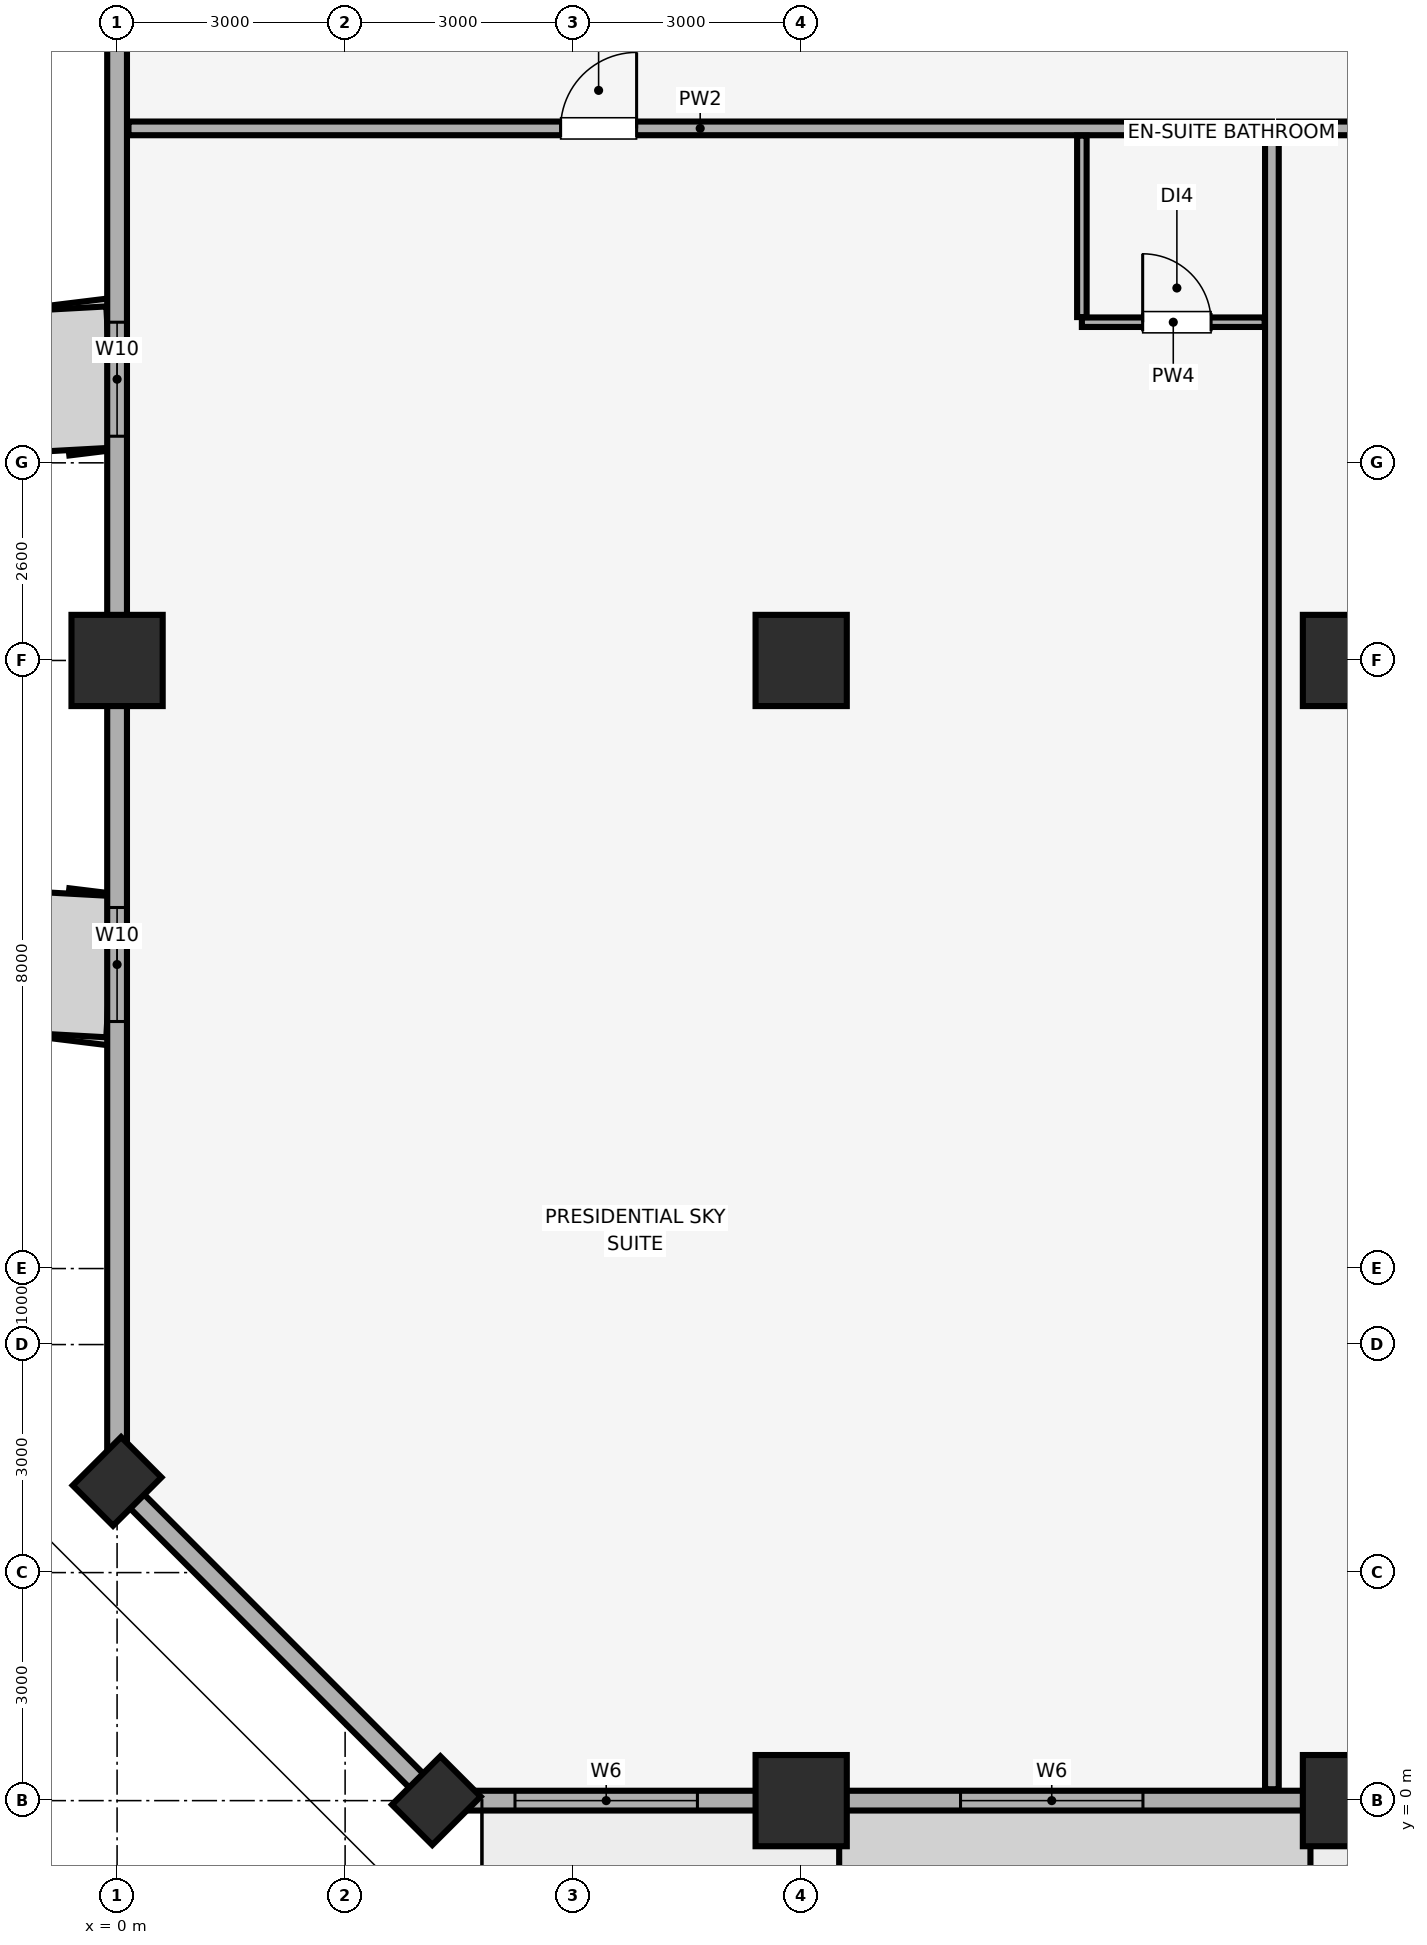
"""IFC4 building model, lengths in metres.
Left out: names, types, materials, properties, quantities, classifications, styles, units other than length and angle.
Written with IfcOpenShell. Run it as: python <this file> out.ifc"""

import sys

from ifc_helpers import new_model, si_unit, direction, frame, frame_2d, origin, origin_2d, place, context, subcontext, project, spatial, rectangle, extrude, element, fill, save


model = new_model("IFC4")
c1 = context("Model", 3, precision=1e-05, world=origin(), true_north=direction((0.0, 1.0)))
c2 = subcontext(c1, "Body", "Model", "MODEL_VIEW")
j1 = project(units=[si_unit("LENGTHUNIT", "METRE"), si_unit("PLANEANGLEUNIT", "RADIAN")], contexts=[c1])
p1 = place(None, origin())
s1 = spatial("IfcSite", under=j1, at=p1, CompositionType="ELEMENT")
p2 = place(p1, origin())
s2 = spatial("IfcBuilding", under=s1, at=p2, CompositionType="ELEMENT")
p3 = place(p2, frame((0.0, 0.0, 104.3)))
s3 = spatial("IfcBuildingStorey", under=s2, at=p3, CompositionType="ELEMENT", Elevation=104.3)
for number, where, z_axis, x_axis in (
    (1, (9.0, 0.0, 0.0), (0.0, 0.0, 1.0), (1.0, 0.0, 0.0)),
    (2, (16.2, 0.0, 0.0), (0.0, 0.0, 1.0), (1.0, 0.0, 0.0)),
    (3, (0.0, 15.0, 0.0), (0.0, 0.0, 1.0), (1.0, 0.0, 0.0)),
):
    element("IfcColumn", number, at=place(p3, frame(where, z_axis=z_axis, x_axis=x_axis)), inside=s3, PredefinedType="COLUMN", context=c2, shape_type="SweptSolid", body=[
        extrude(rectangle(XDim=1.2, YDim=1.2, at=origin_2d()), origin(), (0.0, 0.0, 1.0), 3.51),
    ])
for number, where, z_axis, x_axis in (
    (4, (4.2, 0.0, 0.0), (0.0, 0.0, 1.0), (0.707, 0.707, 0.0)),
    (5, (0.0, 4.2, 0.0), (0.0, 0.0, 1.0), (0.707, 0.707, 0.0)),
):
    element("IfcColumn", number, at=place(p3, frame(where, z_axis=z_axis, x_axis=x_axis)), inside=s3, PredefinedType="PILASTER", context=c2, shape_type="SweptSolid", body=[
        extrude(rectangle(XDim=0.9, YDim=0.75, at=origin_2d()), origin(), (0.0, 0.0, 1.0), 3.51),
    ])
for number, where, z_axis, x_axis in (
    (6, (9.0, 15.0, 0.0), (0.0, 0.0, 1.0), (1.0, 0.0, 0.0)),
    (7, (16.2, 15.0, 0.0), (0.0, 0.0, 1.0), (1.0, 0.0, 0.0)),
):
    element("IfcColumn", number, at=place(p3, frame(where, z_axis=z_axis, x_axis=x_axis)), inside=s3, PredefinedType="COLUMN", context=c2, shape_type="SweptSolid", body=[
        extrude(rectangle(XDim=1.2, YDim=1.2, at=origin_2d()), origin(), (0.0, 0.0, 1.0), 3.51),
    ])
p4 = place(p3, frame((4.2, 0.0, 0.0), z_axis=(0.0, 0.0, 1.0), x_axis=(1.0, 0.0, 0.0)))
e8 = element("IfcWall", 8, at=p4, inside=s3, PredefinedType="SOLIDWALL", context=c2, shape_type="SweptSolid", body=[
    extrude(rectangle(XDim=75.6, YDim=0.26, at=frame_2d((37.8, 0.0))), origin(), (0.0, 0.0, 1.0), 2.56),
])
p5 = place(p4, frame((22.948, 0.0, 0.0)))
e9 = element("IfcOpeningElement", 9, at=p5, cuts=e8, PredefinedType="OPENING", context=c2, shape_type="SweptSolid", body=[
    extrude(rectangle(XDim=1.1, YDim=2.15, at=frame_2d((0.55, 1.075))), frame((0.0, 0.14, 0.0), z_axis=(0.0, -1.0, 0.0), x_axis=(1.0, 0.0, 0.0)), (0.0, 0.0, 1.0), 0.28),
])
p6 = place(p4, frame((44.61, 0.0, 0.0)))
e10 = element("IfcOpeningElement", 10, at=p6, cuts=e8, PredefinedType="OPENING", context=c2, shape_type="SweptSolid", body=[
    extrude(rectangle(XDim=1.1, YDim=2.15, at=frame_2d((0.55, 1.075))), frame((0.0, 0.14, 0.0), z_axis=(0.0, -1.0, 0.0), x_axis=(1.0, 0.0, 0.0)), (0.0, 0.0, 1.0), 0.28),
])
p7 = place(p4, frame((66.272, 0.0, 0.0)))
e11 = element("IfcOpeningElement", 11, at=p7, cuts=e8, PredefinedType="OPENING", context=c2, shape_type="SweptSolid", body=[
    extrude(rectangle(XDim=1.1, YDim=2.15, at=frame_2d((0.55, 1.075))), frame((0.0, 0.14, 0.0), z_axis=(0.0, -1.0, 0.0), x_axis=(1.0, 0.0, 0.0)), (0.0, 0.0, 1.0), 0.28),
])
p8 = place(p4, frame((1.035, 0.0, 0.85)))
e12 = element("IfcOpeningElement", 12, at=p8, cuts=e8, PredefinedType="OPENING", context=c2, shape_type="SweptSolid", body=[
    extrude(rectangle(XDim=2.4, YDim=1.5, at=frame_2d((1.2, 0.75))), frame((0.0, 0.14, 0.0), z_axis=(0.0, -1.0, 0.0), x_axis=(1.0, 0.0, 0.0)), (0.0, 0.0, 1.0), 0.28),
])
p9 = place(p4, frame((6.896, 0.0, 0.85)))
e13 = element("IfcOpeningElement", 13, at=p9, cuts=e8, PredefinedType="OPENING", context=c2, shape_type="SweptSolid", body=[
    extrude(rectangle(XDim=2.4, YDim=1.5, at=frame_2d((1.2, 0.75))), frame((0.0, 0.14, 0.0), z_axis=(0.0, -1.0, 0.0), x_axis=(1.0, 0.0, 0.0)), (0.0, 0.0, 1.0), 0.28),
])
p10 = place(p4, frame((14.4, 0.0, 0.85)))
e14 = element("IfcOpeningElement", 14, at=p10, cuts=e8, PredefinedType="OPENING", context=c2, shape_type="SweptSolid", body=[
    extrude(rectangle(XDim=2.4, YDim=1.5, at=frame_2d((1.2, 0.75))), frame((0.0, 0.14, 0.0), z_axis=(0.0, -1.0, 0.0), x_axis=(1.0, 0.0, 0.0)), (0.0, 0.0, 1.0), 0.28),
])
p11 = place(p4, frame((28.439, 0.0, 0.85)))
e15 = element("IfcOpeningElement", 15, at=p11, cuts=e8, PredefinedType="OPENING", context=c2, shape_type="SweptSolid", body=[
    extrude(rectangle(XDim=2.4, YDim=1.5, at=frame_2d((1.2, 0.75))), frame((0.0, 0.14, 0.0), z_axis=(0.0, -1.0, 0.0), x_axis=(1.0, 0.0, 0.0)), (0.0, 0.0, 1.0), 0.28),
])
p12 = place(p4, frame((36.6, 0.0, 0.85)))
e16 = element("IfcOpeningElement", 16, at=p12, cuts=e8, PredefinedType="OPENING", context=c2, shape_type="SweptSolid", body=[
    extrude(rectangle(XDim=2.4, YDim=1.5, at=frame_2d((1.2, 0.75))), frame((0.0, 0.14, 0.0), z_axis=(0.0, -1.0, 0.0), x_axis=(1.0, 0.0, 0.0)), (0.0, 0.0, 1.0), 0.28),
])
p13 = place(p4, frame((46.59, 0.0, 0.85)))
e17 = element("IfcOpeningElement", 17, at=p13, cuts=e8, PredefinedType="OPENING", context=c2, shape_type="SweptSolid", body=[
    extrude(rectangle(XDim=1.5, YDim=1.4, at=frame_2d((0.75, 0.7))), frame((0.0, 0.14, 0.0), z_axis=(0.0, -1.0, 0.0), x_axis=(1.0, 0.0, 0.0)), (0.0, 0.0, 1.0), 0.28),
])
p14 = place(p4, frame((50.583, 0.0, 0.85)))
e18 = element("IfcOpeningElement", 18, at=p14, cuts=e8, PredefinedType="OPENING", context=c2, shape_type="SweptSolid", body=[
    extrude(rectangle(XDim=2.4, YDim=1.5, at=frame_2d((1.2, 0.75))), frame((0.0, 0.14, 0.0), z_axis=(0.0, -1.0, 0.0), x_axis=(1.0, 0.0, 0.0)), (0.0, 0.0, 1.0), 0.28),
])
p15 = place(p4, frame((58.8, 0.0, 0.85)))
e19 = element("IfcOpeningElement", 19, at=p15, cuts=e8, PredefinedType="OPENING", context=c2, shape_type="SweptSolid", body=[
    extrude(rectangle(XDim=2.4, YDim=1.5, at=frame_2d((1.2, 0.75))), frame((0.0, 0.14, 0.0), z_axis=(0.0, -1.0, 0.0), x_axis=(1.0, 0.0, 0.0)), (0.0, 0.0, 1.0), 0.28),
])
p16 = place(p4, frame((68.221, 0.0, 0.85)))
e20 = element("IfcOpeningElement", 20, at=p16, cuts=e8, PredefinedType="OPENING", context=c2, shape_type="SweptSolid", body=[
    extrude(rectangle(XDim=1.5, YDim=1.4, at=frame_2d((0.75, 0.7))), frame((0.0, 0.14, 0.0), z_axis=(0.0, -1.0, 0.0), x_axis=(1.0, 0.0, 0.0)), (0.0, 0.0, 1.0), 0.28),
])
p17 = place(p4, frame((72.165, 0.0, 0.85)))
e21 = element("IfcOpeningElement", 21, at=p17, cuts=e8, PredefinedType="OPENING", context=c2, shape_type="SweptSolid", body=[
    extrude(rectangle(XDim=2.4, YDim=1.5, at=frame_2d((1.2, 0.75))), frame((0.0, 0.14, 0.0), z_axis=(0.0, -1.0, 0.0), x_axis=(1.0, 0.0, 0.0)), (0.0, 0.0, 1.0), 0.28),
])
p18 = place(p3, frame((0.0, 44.8, 0.0), z_axis=(0.0, 0.0, 1.0), x_axis=(0.0, -1.0, 0.0)))
e22 = element("IfcWall", 22, at=p18, inside=s3, PredefinedType="SOLIDWALL", context=c2, shape_type="SweptSolid", body=[
    extrude(rectangle(XDim=40.6, YDim=0.26, at=frame_2d((20.3, 0.0))), origin(), (0.0, 0.0, 1.0), 2.56),
])
p19 = place(p18, frame((33.05, 0.0, 0.85)))
e23 = element("IfcOpeningElement", 23, at=p19, cuts=e22, PredefinedType="OPENING", context=c2, shape_type="SweptSolid", body=[
    extrude(rectangle(XDim=1.5, YDim=1.4, at=frame_2d((0.75, 0.7))), frame((0.0, 0.14, 0.0), z_axis=(0.0, -1.0, 0.0), x_axis=(1.0, 0.0, 0.0)), (0.0, 0.0, 1.0), 0.28),
])
p20 = place(p18, frame((25.35, 0.0, 0.85)))
e24 = element("IfcOpeningElement", 24, at=p20, cuts=e22, PredefinedType="OPENING", context=c2, shape_type="SweptSolid", body=[
    extrude(rectangle(XDim=1.5, YDim=1.4, at=frame_2d((0.75, 0.7))), frame((0.0, 0.14, 0.0), z_axis=(0.0, -1.0, 0.0), x_axis=(1.0, 0.0, 0.0)), (0.0, 0.0, 1.0), 0.28),
])
p21 = place(p18, frame((17.625, 0.0, 0.85)))
e25 = element("IfcOpeningElement", 25, at=p21, cuts=e22, PredefinedType="OPENING", context=c2, shape_type="SweptSolid", body=[
    extrude(rectangle(XDim=1.5, YDim=1.4, at=frame_2d((0.75, 0.7))), frame((0.0, 0.14, 0.0), z_axis=(0.0, -1.0, 0.0), x_axis=(1.0, 0.0, 0.0)), (0.0, 0.0, 1.0), 0.28),
])
p22 = place(p18, frame((9.75, 0.0, 0.85)))
e26 = element("IfcOpeningElement", 26, at=p22, cuts=e22, PredefinedType="OPENING", context=c2, shape_type="SweptSolid", body=[
    extrude(rectangle(XDim=1.5, YDim=1.4, at=frame_2d((0.75, 0.7))), frame((0.0, 0.14, 0.0), z_axis=(0.0, -1.0, 0.0), x_axis=(1.0, 0.0, 0.0)), (0.0, 0.0, 1.0), 0.28),
])
p23 = place(p18, frame((1.735, 0.0, 0.85)))
e27 = element("IfcOpeningElement", 27, at=p23, cuts=e22, PredefinedType="OPENING", context=c2, shape_type="SweptSolid", body=[
    extrude(rectangle(XDim=1.5, YDim=1.4, at=frame_2d((0.75, 0.7))), frame((0.0, 0.14, 0.0), z_axis=(0.0, -1.0, 0.0), x_axis=(1.0, 0.0, 0.0)), (0.0, 0.0, 1.0), 0.28),
])
p24 = place(p3, frame((0.0, 4.2, 0.0), z_axis=(0.0, 0.0, 1.0), x_axis=(0.707106781187, -0.707106781187, 0.0)))
e28 = element("IfcWall", 28, at=p24, inside=s3, PredefinedType="SOLIDWALL", context=c2, shape_type="SweptSolid", body=[
    extrude(rectangle(XDim=5.94, YDim=0.26, at=frame_2d((2.97, 0.0))), origin(), (0.0, 0.0, 1.0), 2.56),
])
p25 = place(p3, frame((0.15, 22.0, 0.0), z_axis=(0.0, 0.0, 1.0), x_axis=(1.0, 0.0, 0.0)))
e29 = element("IfcWall", 29, at=p25, inside=s3, PredefinedType="PARTITIONING", context=c2, shape_type="SweptSolid", body=[
    extrude(rectangle(XDim=15.043, YDim=0.18, at=frame_2d((7.521, 0.0))), origin(), (0.0, 0.0, 1.0), 3.51),
])
p26 = place(p25, frame((5.685, 0.0, 0.0)))
e30 = element("IfcOpeningElement", 30, at=p26, cuts=e29, PredefinedType="OPENING", context=c2, shape_type="SweptSolid", body=[
    extrude(rectangle(XDim=1.0, YDim=2.15, at=frame_2d((0.5, 1.075))), frame((0.0, 0.1, 0.0), z_axis=(0.0, -1.0, 0.0), x_axis=(1.0, 0.0, 0.0)), (0.0, 0.0, 1.0), 0.2),
])
p27 = place(p3, frame((15.193, 0.15, 0.0), z_axis=(0.0, 0.0, 1.0), x_axis=(0.0, 1.0, 0.0)))
e31 = element("IfcWall", 31, at=p27, inside=s3, PredefinedType="PARTITIONING", context=c2, shape_type="SweptSolid", body=[
    extrude(rectangle(XDim=21.755, YDim=0.18, at=frame_2d((10.877, 0.0))), origin(), (0.0, 0.0, 1.0), 3.51),
])
p28 = place(p3, frame((12.693, 19.45, 0.0), z_axis=(0.0, 0.0, 1.0), x_axis=(1.0, 0.0, 0.0)))
e32 = element("IfcWall", 32, at=p28, inside=s3, PredefinedType="PARTITIONING", context=c2, shape_type="SweptSolid", body=[
    extrude(rectangle(XDim=2.405, YDim=0.125, at=frame_2d((1.203, 0.0))), origin(), (0.0, 0.0, 1.0), 3.51),
])
p29 = place(p28, frame((0.8, 0.0, 0.0)))
e33 = element("IfcOpeningElement", 33, at=p29, cuts=e32, PredefinedType="OPENING", context=c2, shape_type="SweptSolid", body=[
    extrude(rectangle(XDim=0.9, YDim=2.1, at=frame_2d((0.45, 1.05))), frame((0.0, 0.073, 0.0), z_axis=(0.0, -1.0, 0.0), x_axis=(1.0, 0.0, 0.0)), (0.0, 0.0, 1.0), 0.145),
])
p30 = place(p3, frame((12.693, 19.518, 0.0), z_axis=(0.0, 0.0, 1.0), x_axis=(0.0, 1.0, 0.0)))
e34 = element("IfcWall", 34, at=p30, inside=s3, PredefinedType="PARTITIONING", context=c2, shape_type="SweptSolid", body=[
    extrude(rectangle(XDim=2.387, YDim=0.125, at=frame_2d((1.194, 0.0))), origin(), (0.0, 0.0, 1.0), 2.977),
])
p31 = place(p3, frame((15.288, 22.0, 0.0), z_axis=(0.0, 0.0, 1.0), x_axis=(1.0, 0.0, 0.0)))
e35 = element("IfcWall", 35, at=p31, inside=s3, PredefinedType="PARTITIONING", context=c2, shape_type="SweptSolid", body=[
    extrude(rectangle(XDim=10.648, YDim=0.18, at=frame_2d((5.324, 0.0))), origin(), (0.0, 0.0, 1.0), 3.51),
])
p32 = place(p31, frame((3.97, 0.0, 0.0)))
e36 = element("IfcOpeningElement", 36, at=p32, cuts=e35, PredefinedType="OPENING", context=c2, shape_type="SweptSolid", body=[
    extrude(rectangle(XDim=1.0, YDim=2.15, at=frame_2d((0.5, 1.075))), frame((0.0, 0.1, 0.0), z_axis=(0.0, -1.0, 0.0), x_axis=(1.0, 0.0, 0.0)), (0.0, 0.0, 1.0), 0.2),
])
p33 = place(p8, origin())
e37 = element("IfcWindow", 37, at=p33, inside=s3, PartitioningType="SINGLE_PANEL", PredefinedType="WINDOW", context=c2, shape_type="SweptSolid", body=[
    extrude(rectangle(XDim=2.4, YDim=1.5, at=frame_2d((1.2, 0.75))), frame((0.0, 0.03, 0.0), z_axis=(0.0, -1.0, 0.0), x_axis=(1.0, 0.0, 0.0)), (0.0, 0.0, 1.0), 0.06),
])
fill(e12, e37)
p34 = place(p9, origin())
e38 = element("IfcWindow", 38, at=p34, inside=s3, PartitioningType="SINGLE_PANEL", PredefinedType="WINDOW", context=c2, shape_type="SweptSolid", body=[
    extrude(rectangle(XDim=2.4, YDim=1.5, at=frame_2d((1.2, 0.75))), frame((0.0, 0.03, 0.0), z_axis=(0.0, -1.0, 0.0), x_axis=(1.0, 0.0, 0.0)), (0.0, 0.0, 1.0), 0.06),
])
fill(e13, e38)
p35 = place(p19, origin())
e39 = element("IfcWindow", 39, at=p35, inside=s3, PartitioningType="SINGLE_PANEL", PredefinedType="WINDOW", context=c2, shape_type="SweptSolid", body=[
    extrude(rectangle(XDim=1.5, YDim=1.4, at=frame_2d((0.75, 0.7))), frame((0.0, 0.03, 0.0), z_axis=(0.0, -1.0, 0.0), x_axis=(1.0, 0.0, 0.0)), (0.0, 0.0, 1.0), 0.06),
])
fill(e23, e39)
p36 = place(p20, origin())
e40 = element("IfcWindow", 40, at=p36, inside=s3, PartitioningType="SINGLE_PANEL", PredefinedType="WINDOW", context=c2, shape_type="SweptSolid", body=[
    extrude(rectangle(XDim=1.5, YDim=1.4, at=frame_2d((0.75, 0.7))), frame((0.0, 0.03, 0.0), z_axis=(0.0, -1.0, 0.0), x_axis=(1.0, 0.0, 0.0)), (0.0, 0.0, 1.0), 0.06),
])
fill(e24, e40)
p37 = place(p26, origin())
e41 = element("IfcDoor", 41, at=p37, inside=s3, OperationType="SINGLE_SWING_RIGHT", PredefinedType="DOOR", context=c2, shape_type="SweptSolid", body=[
    extrude(rectangle(XDim=1.0, YDim=2.15, at=frame_2d((0.5, 1.075))), frame((0.0, 0.025, 0.0), z_axis=(0.0, -1.0, 0.0), x_axis=(1.0, 0.0, 0.0)), (0.0, 0.0, 1.0), 0.05),
])
fill(e30, e41)
p38 = place(p29, origin())
e42 = element("IfcDoor", 42, at=p38, inside=s3, OperationType="SINGLE_SWING_LEFT", PredefinedType="DOOR", context=c2, shape_type="SweptSolid", body=[
    extrude(rectangle(XDim=0.9, YDim=2.1, at=frame_2d((0.45, 1.05))), frame((0.0, 0.025, 0.0), z_axis=(0.0, -1.0, 0.0), x_axis=(1.0, 0.0, 0.0)), (0.0, 0.0, 1.0), 0.05),
])
fill(e33, e42)
save(model, sys.argv[1])
